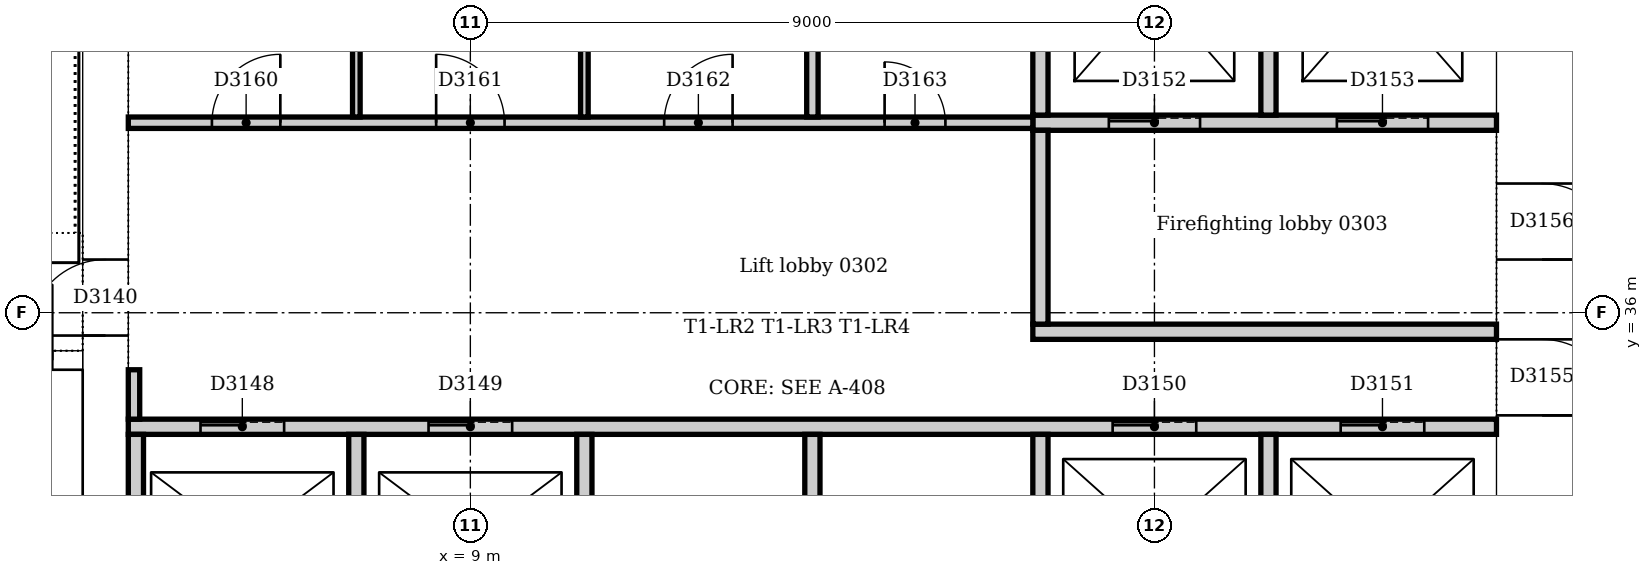
"""IFC4 building model, lengths in metres.
Left out: names, types, materials, properties, quantities, classifications, styles, units other than length and angle.
Written with IfcOpenShell. Run it as: python <this file> out.ifc"""

import sys

from ifc_helpers import new_model, si_unit, direction, frame, frame_2d, origin, place, context, subcontext, project, spatial, rectangle, extrude, element, fill, save


model = new_model("IFC4")
c1 = context("Model", 3, precision=1e-05, world=origin(), true_north=direction((0.0, 1.0)))
c2 = subcontext(c1, "Body", "Model", "MODEL_VIEW")
j1 = project(units=[si_unit("LENGTHUNIT", "METRE"), si_unit("PLANEANGLEUNIT", "RADIAN")], contexts=[c1])
p1 = place(None, origin())
s1 = spatial("IfcSite", under=j1, at=p1, CompositionType="ELEMENT")
p2 = place(p1, origin())
s2 = spatial("IfcBuilding", under=s1, at=p2, CompositionType="ELEMENT")
p3 = place(p2, frame((0.0, 0.0, 16.0)))
s3 = spatial("IfcBuildingStorey", under=s2, at=p3, CompositionType="ELEMENT", Elevation=16.0)
p4 = place(p3, frame((23.1, 31.5, 0.0), z_axis=(0.0, 0.0, 1.0), x_axis=(0.0, 1.0, 0.0)))
e1 = element("IfcWall", 1, at=p4, inside=s3, PredefinedType="SOLIDWALL", context=c2, shape_type="SweptSolid", body=[
    extrude(rectangle(XDim=10.5, YDim=1.2, at=frame_2d((5.25, 0.0))), origin(), (0.0, 0.0, 1.0), 5.0),
])
p5 = place(p4, frame((3.15, 0.0, 0.0)))
e2 = element("IfcOpeningElement", 2, at=p5, cuts=e1, PredefinedType="OPENING", context=c2, shape_type="SweptSolid", body=[
    extrude(rectangle(XDim=1.0, YDim=2.1, at=frame_2d((0.5, 1.05))), frame((0.0, 0.61, 0.0), z_axis=(0.0, -1.0, 0.0), x_axis=(1.0, 0.0, 0.0)), (0.0, 0.0, 1.0), 1.22),
])
p6 = place(p4, frame((5.2, 0.0, 0.0)))
e3 = element("IfcOpeningElement", 3, at=p6, cuts=e1, PredefinedType="OPENING", context=c2, shape_type="SweptSolid", body=[
    extrude(rectangle(XDim=1.0, YDim=2.1, at=frame_2d((0.5, 1.05))), frame((0.0, 0.61, 0.0), z_axis=(0.0, -1.0, 0.0), x_axis=(1.0, 0.0, 0.0)), (0.0, 0.0, 1.0), 1.22),
])
p7 = place(p3, frame((4.2, 42.0, 0.0), z_axis=(0.0, 0.0, 1.0), x_axis=(0.0, -1.0, 0.0)))
e4 = element("IfcWall", 4, at=p7, inside=s3, PredefinedType="SOLIDWALL", context=c2, shape_type="SweptSolid", body=[
    extrude(rectangle(XDim=10.5, YDim=0.6, at=frame_2d((5.25, 0.0))), origin(), (0.0, 0.0, 1.0), 5.0),
])
p8 = place(p7, frame((5.3, 0.0, 0.0)))
e5 = element("IfcOpeningElement", 5, at=p8, cuts=e4, PredefinedType="OPENING", context=c2, shape_type="SweptSolid", body=[
    extrude(rectangle(XDim=1.0, YDim=2.1, at=frame_2d((0.5, 1.05))), frame((0.0, 0.31, 0.0), z_axis=(0.0, -1.0, 0.0), x_axis=(1.0, 0.0, 0.0)), (0.0, 0.0, 1.0), 0.62),
])
p9 = place(p3, frame((0.36, 35.375, 0.0), z_axis=(0.0, 0.0, 1.0), x_axis=(1.0, 0.0, 0.0)))
e6 = element("IfcWall", 6, at=p9, inside=s3, PredefinedType="SOLIDWALL", context=c2, shape_type="SweptSolid", body=[
    extrude(rectangle(XDim=3.54, YDim=0.25, at=frame_2d((1.77, 0.0))), origin(), (0.0, 0.0, 1.0), 5.0),
])
p10 = place(p9, frame((2.14, 0.0, 0.0)))
e7 = element("IfcOpeningElement", 7, at=p10, cuts=e6, PredefinedType="OPENING", context=c2, shape_type="SweptSolid", body=[
    extrude(rectangle(XDim=1.0, YDim=2.1, at=frame_2d((0.5, 1.05))), frame((0.0, 0.135, 0.0), z_axis=(0.0, -1.0, 0.0), x_axis=(1.0, 0.0, 0.0)), (0.0, 0.0, 1.0), 0.27),
])
p11 = place(p3, frame((16.4, 35.75, 0.0), z_axis=(0.0, 0.0, 1.0), x_axis=(1.0, 0.0, 0.0)))
e8 = element("IfcWall", 8, at=p11, inside=s3, PredefinedType="PARTITIONING", context=c2, shape_type="SweptSolid", body=[
    extrude(rectangle(XDim=6.1, YDim=0.2, at=frame_2d((3.05, 0.0))), origin(), (0.0, 0.0, 1.0), 4.7),
])
p12 = place(p3, frame((16.4, 38.5, 0.0), z_axis=(0.0, 0.0, 1.0), x_axis=(1.0, 0.0, 0.0)))
e9 = element("IfcWall", 9, at=p12, inside=s3, PredefinedType="PARTITIONING", context=c2, shape_type="SweptSolid", body=[
    extrude(rectangle(XDim=6.1, YDim=0.2, at=frame_2d((3.05, 0.0))), origin(), (0.0, 0.0, 1.0), 4.7),
])
p13 = place(p12, frame((1.0, 0.0, 0.0)))
e10 = element("IfcOpeningElement", 10, at=p13, cuts=e9, PredefinedType="OPENING", context=c2, shape_type="SweptSolid", body=[
    extrude(rectangle(XDim=1.2, YDim=2.1, at=frame_2d((0.6, 1.05))), frame((0.0, 0.11, 0.0), z_axis=(0.0, -1.0, 0.0), x_axis=(1.0, 0.0, 0.0)), (0.0, 0.0, 1.0), 0.22),
])
p14 = place(p12, frame((4.0, 0.0, 0.0)))
e11 = element("IfcOpeningElement", 11, at=p14, cuts=e9, PredefinedType="OPENING", context=c2, shape_type="SweptSolid", body=[
    extrude(rectangle(XDim=1.2, YDim=2.1, at=frame_2d((0.6, 1.05))), frame((0.0, 0.11, 0.0), z_axis=(0.0, -1.0, 0.0), x_axis=(1.0, 0.0, 0.0)), (0.0, 0.0, 1.0), 0.22),
])
p15 = place(p3, frame((16.5, 35.85, 0.0), z_axis=(0.0, 0.0, 1.0), x_axis=(0.0, 1.0, 0.0)))
e12 = element("IfcWall", 12, at=p15, inside=s3, PredefinedType="PARTITIONING", context=c2, shape_type="SweptSolid", body=[
    extrude(rectangle(XDim=2.55, YDim=0.2, at=frame_2d((1.275, 0.0))), origin(), (0.0, 0.0, 1.0), 4.7),
])
p16 = place(p3, frame((4.5, 34.5, 0.0), z_axis=(0.0, 0.0, 1.0), x_axis=(1.0, 0.0, 0.0)))
e13 = element("IfcWall", 13, at=p16, inside=s3, PredefinedType="PARTITIONING", context=c2, shape_type="SweptSolid", body=[
    extrude(rectangle(XDim=18.0, YDim=0.2, at=frame_2d((9.0, 0.0))), origin(), (0.0, 0.0, 1.0), 4.7),
])
p17 = place(p16, frame((0.95, 0.0, 0.0)))
e14 = element("IfcOpeningElement", 14, at=p17, cuts=e13, PredefinedType="OPENING", context=c2, shape_type="SweptSolid", body=[
    extrude(rectangle(XDim=1.1, YDim=2.1, at=frame_2d((0.55, 1.05))), frame((0.0, 0.11, 0.0), z_axis=(0.0, -1.0, 0.0), x_axis=(1.0, 0.0, 0.0)), (0.0, 0.0, 1.0), 0.22),
])
p18 = place(p16, frame((3.95, 0.0, 0.0)))
e15 = element("IfcOpeningElement", 15, at=p18, cuts=e13, PredefinedType="OPENING", context=c2, shape_type="SweptSolid", body=[
    extrude(rectangle(XDim=1.1, YDim=2.1, at=frame_2d((0.55, 1.05))), frame((0.0, 0.11, 0.0), z_axis=(0.0, -1.0, 0.0), x_axis=(1.0, 0.0, 0.0)), (0.0, 0.0, 1.0), 0.22),
])
p19 = place(p16, frame((12.95, 0.0, 0.0)))
e16 = element("IfcOpeningElement", 16, at=p19, cuts=e13, PredefinedType="OPENING", context=c2, shape_type="SweptSolid", body=[
    extrude(rectangle(XDim=1.1, YDim=2.1, at=frame_2d((0.55, 1.05))), frame((0.0, 0.11, 0.0), z_axis=(0.0, -1.0, 0.0), x_axis=(1.0, 0.0, 0.0)), (0.0, 0.0, 1.0), 0.22),
])
p20 = place(p16, frame((15.95, 0.0, 0.0)))
e17 = element("IfcOpeningElement", 17, at=p20, cuts=e13, PredefinedType="OPENING", context=c2, shape_type="SweptSolid", body=[
    extrude(rectangle(XDim=1.1, YDim=2.1, at=frame_2d((0.55, 1.05))), frame((0.0, 0.11, 0.0), z_axis=(0.0, -1.0, 0.0), x_axis=(1.0, 0.0, 0.0)), (0.0, 0.0, 1.0), 0.22),
])
for number, where, z_axis, x_axis in (
    (18, (16.5, 38.6, 0.0), (0.0, 0.0, 1.0), (0.0, 1.0, 0.0)),
    (19, (19.5, 38.6, 0.0), (0.0, 0.0, 1.0), (0.0, 1.0, 0.0)),
):
    element("IfcWall", number, at=place(p3, frame(where, z_axis=z_axis, x_axis=x_axis)), inside=s3, PredefinedType="PARTITIONING", context=c2, shape_type="SweptSolid", body=[
        extrude(rectangle(XDim=3.4, YDim=0.2, at=frame_2d((1.7, 0.0))), origin(), (0.0, 0.0, 1.0), 4.7),
    ])
for number, where, z_axis, x_axis in (
    (20, (4.6, 31.75, 0.0), (0.0, 0.0, 1.0), (0.0, 1.0, 0.0)),
    (21, (7.5, 31.75, 0.0), (0.0, 0.0, 1.0), (0.0, 1.0, 0.0)),
    (22, (10.5, 31.75, 0.0), (0.0, 0.0, 1.0), (0.0, 1.0, 0.0)),
    (23, (13.5, 31.75, 0.0), (0.0, 0.0, 1.0), (0.0, 1.0, 0.0)),
    (24, (16.5, 31.75, 0.0), (0.0, 0.0, 1.0), (0.0, 1.0, 0.0)),
    (25, (19.5, 31.75, 0.0), (0.0, 0.0, 1.0), (0.0, 1.0, 0.0)),
):
    element("IfcWall", number, at=place(p3, frame(where, z_axis=z_axis, x_axis=x_axis)), inside=s3, PredefinedType="PARTITIONING", context=c2, shape_type="SweptSolid", body=[
        extrude(rectangle(XDim=2.65, YDim=0.2, at=frame_2d((1.325, 0.0))), origin(), (0.0, 0.0, 1.0), 4.7),
    ])
p21 = place(p3, frame((4.5, 38.5, 0.0), z_axis=(0.0, 0.0, 1.0), x_axis=(1.0, 0.0, 0.0)))
e26 = element("IfcWall", 26, at=p21, inside=s3, PredefinedType="PARTITIONING", context=c2, shape_type="SweptSolid", body=[
    extrude(rectangle(XDim=11.9, YDim=0.15, at=frame_2d((5.95, 0.0))), origin(), (0.0, 0.0, 1.0), 4.7),
])
p22 = place(p21, frame((1.1, 0.0, 0.0)))
e27 = element("IfcOpeningElement", 27, at=p22, cuts=e26, PredefinedType="OPENING", context=c2, shape_type="SweptSolid", body=[
    extrude(rectangle(XDim=0.9, YDim=2.1, at=frame_2d((0.45, 1.05))), frame((0.0, 0.085, 0.0), z_axis=(0.0, -1.0, 0.0), x_axis=(1.0, 0.0, 0.0)), (0.0, 0.0, 1.0), 0.17),
])
p23 = place(p21, frame((4.05, 0.0, 0.0)))
e28 = element("IfcOpeningElement", 28, at=p23, cuts=e26, PredefinedType="OPENING", context=c2, shape_type="SweptSolid", body=[
    extrude(rectangle(XDim=0.9, YDim=2.1, at=frame_2d((0.45, 1.05))), frame((0.0, 0.085, 0.0), z_axis=(0.0, -1.0, 0.0), x_axis=(1.0, 0.0, 0.0)), (0.0, 0.0, 1.0), 0.17),
])
p24 = place(p21, frame((7.05, 0.0, 0.0)))
e29 = element("IfcOpeningElement", 29, at=p24, cuts=e26, PredefinedType="OPENING", context=c2, shape_type="SweptSolid", body=[
    extrude(rectangle(XDim=0.9, YDim=2.1, at=frame_2d((0.45, 1.05))), frame((0.0, 0.085, 0.0), z_axis=(0.0, -1.0, 0.0), x_axis=(1.0, 0.0, 0.0)), (0.0, 0.0, 1.0), 0.17),
])
p25 = place(p21, frame((9.95, 0.0, 0.0)))
e30 = element("IfcOpeningElement", 30, at=p25, cuts=e26, PredefinedType="OPENING", context=c2, shape_type="SweptSolid", body=[
    extrude(rectangle(XDim=0.8, YDim=2.1, at=frame_2d((0.4, 1.05))), frame((0.0, 0.085, 0.0), z_axis=(0.0, -1.0, 0.0), x_axis=(1.0, 0.0, 0.0)), (0.0, 0.0, 1.0), 0.17),
])
p26 = place(p3, frame((4.575, 34.6, 0.0), z_axis=(0.0, 0.0, 1.0), x_axis=(0.0, 1.0, 0.0)))
e31 = element("IfcWall", 31, at=p26, inside=s3, PredefinedType="PARTITIONING", context=c2, shape_type="SweptSolid", body=[
    extrude(rectangle(XDim=0.65, YDim=0.15, at=frame_2d((0.325, 0.0))), origin(), (0.0, 0.0, 1.0), 4.7),
])
p27 = place(p3, frame((13.5, 38.575, 0.0), z_axis=(0.0, 0.0, 1.0), x_axis=(0.0, 1.0, 0.0)))
e32 = element("IfcWall", 32, at=p27, inside=s3, PredefinedType="PARTITIONING", context=c2, shape_type="SweptSolid", body=[
    extrude(rectangle(XDim=3.425, YDim=0.15, at=frame_2d((1.712, 0.0))), origin(), (0.0, 0.0, 1.0), 4.7),
])
for number, where, z_axis, x_axis in (
    (33, (7.5, 38.575, 0.0), (0.0, 0.0, 1.0), (0.0, 1.0, 0.0)),
    (34, (10.5, 38.575, 0.0), (0.0, 0.0, 1.0), (0.0, 1.0, 0.0)),
):
    element("IfcWall", number, at=place(p3, frame(where, z_axis=z_axis, x_axis=x_axis)), inside=s3, PredefinedType="PARTITIONING", context=c2, shape_type="SweptSolid", body=[
        extrude(rectangle(XDim=3.425, YDim=0.1, at=frame_2d((1.712, 0.0))), origin(), (0.0, 0.0, 1.0), 4.7),
    ])
p28 = place(p8, frame((1.0, 0.0, 0.0), z_axis=(0.0, 0.0, 1.0), x_axis=(-1.0, 0.0, 0.0)))
e35 = element("IfcDoor", 35, at=p28, inside=s3, OperationType="SINGLE_SWING_LEFT", PredefinedType="DOOR", context=c2, shape_type="SweptSolid", body=[
    extrude(rectangle(XDim=1.0, YDim=2.1, at=frame_2d((0.5, 1.05))), frame((0.0, 0.025, 0.0), z_axis=(0.0, -1.0, 0.0), x_axis=(1.0, 0.0, 0.0)), (0.0, 0.0, 1.0), 0.05),
])
fill(e5, e35)
p29 = place(p17, origin())
e36 = element("IfcDoor", 36, at=p29, inside=s3, OperationType="SLIDING_TO_LEFT", PredefinedType="DOOR", context=c2, shape_type="SweptSolid", body=[
    extrude(rectangle(XDim=1.1, YDim=2.1, at=frame_2d((0.55, 1.05))), frame((0.0, 0.025, 0.0), z_axis=(0.0, -1.0, 0.0), x_axis=(1.0, 0.0, 0.0)), (0.0, 0.0, 1.0), 0.05),
])
fill(e14, e36)
p30 = place(p18, origin())
e37 = element("IfcDoor", 37, at=p30, inside=s3, OperationType="SLIDING_TO_LEFT", PredefinedType="DOOR", context=c2, shape_type="SweptSolid", body=[
    extrude(rectangle(XDim=1.1, YDim=2.1, at=frame_2d((0.55, 1.05))), frame((0.0, 0.025, 0.0), z_axis=(0.0, -1.0, 0.0), x_axis=(1.0, 0.0, 0.0)), (0.0, 0.0, 1.0), 0.05),
])
fill(e15, e37)
p31 = place(p19, origin())
e38 = element("IfcDoor", 38, at=p31, inside=s3, OperationType="SLIDING_TO_LEFT", PredefinedType="DOOR", context=c2, shape_type="SweptSolid", body=[
    extrude(rectangle(XDim=1.1, YDim=2.1, at=frame_2d((0.55, 1.05))), frame((0.0, 0.025, 0.0), z_axis=(0.0, -1.0, 0.0), x_axis=(1.0, 0.0, 0.0)), (0.0, 0.0, 1.0), 0.05),
])
fill(e16, e38)
p32 = place(p20, origin())
e39 = element("IfcDoor", 39, at=p32, inside=s3, OperationType="SLIDING_TO_LEFT", PredefinedType="DOOR", context=c2, shape_type="SweptSolid", body=[
    extrude(rectangle(XDim=1.1, YDim=2.1, at=frame_2d((0.55, 1.05))), frame((0.0, 0.025, 0.0), z_axis=(0.0, -1.0, 0.0), x_axis=(1.0, 0.0, 0.0)), (0.0, 0.0, 1.0), 0.05),
])
fill(e17, e39)
p33 = place(p13, origin())
e40 = element("IfcDoor", 40, at=p33, inside=s3, OperationType="SLIDING_TO_LEFT", PredefinedType="DOOR", context=c2, shape_type="SweptSolid", body=[
    extrude(rectangle(XDim=1.2, YDim=2.1, at=frame_2d((0.6, 1.05))), frame((0.0, 0.025, 0.0), z_axis=(0.0, -1.0, 0.0), x_axis=(1.0, 0.0, 0.0)), (0.0, 0.0, 1.0), 0.05),
])
fill(e10, e40)
p34 = place(p14, origin())
e41 = element("IfcDoor", 41, at=p34, inside=s3, OperationType="SLIDING_TO_LEFT", PredefinedType="DOOR", context=c2, shape_type="SweptSolid", body=[
    extrude(rectangle(XDim=1.2, YDim=2.1, at=frame_2d((0.6, 1.05))), frame((0.0, 0.025, 0.0), z_axis=(0.0, -1.0, 0.0), x_axis=(1.0, 0.0, 0.0)), (0.0, 0.0, 1.0), 0.05),
])
fill(e11, e41)
p35 = place(p5, frame((1.0, 0.0, 0.0), z_axis=(0.0, 0.0, 1.0), x_axis=(-1.0, 0.0, 0.0)))
e42 = element("IfcDoor", 42, at=p35, inside=s3, OperationType="SINGLE_SWING_RIGHT", PredefinedType="DOOR", context=c2, shape_type="SweptSolid", body=[
    extrude(rectangle(XDim=1.0, YDim=2.1, at=frame_2d((0.5, 1.05))), frame((0.0, 0.025, 0.0), z_axis=(0.0, -1.0, 0.0), x_axis=(1.0, 0.0, 0.0)), (0.0, 0.0, 1.0), 0.05),
])
fill(e2, e42)
p36 = place(p6, frame((1.0, 0.0, 0.0), z_axis=(0.0, 0.0, 1.0), x_axis=(-1.0, 0.0, 0.0)))
e43 = element("IfcDoor", 43, at=p36, inside=s3, OperationType="SINGLE_SWING_RIGHT", PredefinedType="DOOR", context=c2, shape_type="SweptSolid", body=[
    extrude(rectangle(XDim=1.0, YDim=2.1, at=frame_2d((0.5, 1.05))), frame((0.0, 0.025, 0.0), z_axis=(0.0, -1.0, 0.0), x_axis=(1.0, 0.0, 0.0)), (0.0, 0.0, 1.0), 0.05),
])
fill(e3, e43)
p37 = place(p22, origin())
e44 = element("IfcDoor", 44, at=p37, inside=s3, OperationType="SINGLE_SWING_RIGHT", PredefinedType="DOOR", context=c2, shape_type="SweptSolid", body=[
    extrude(rectangle(XDim=0.9, YDim=2.1, at=frame_2d((0.45, 1.05))), frame((0.0, 0.025, 0.0), z_axis=(0.0, -1.0, 0.0), x_axis=(1.0, 0.0, 0.0)), (0.0, 0.0, 1.0), 0.05),
])
fill(e27, e44)
p38 = place(p23, origin())
e45 = element("IfcDoor", 45, at=p38, inside=s3, OperationType="SINGLE_SWING_LEFT", PredefinedType="DOOR", context=c2, shape_type="SweptSolid", body=[
    extrude(rectangle(XDim=0.9, YDim=2.1, at=frame_2d((0.45, 1.05))), frame((0.0, 0.025, 0.0), z_axis=(0.0, -1.0, 0.0), x_axis=(1.0, 0.0, 0.0)), (0.0, 0.0, 1.0), 0.05),
])
fill(e28, e45)
p39 = place(p24, origin())
e46 = element("IfcDoor", 46, at=p39, inside=s3, OperationType="SINGLE_SWING_RIGHT", PredefinedType="DOOR", context=c2, shape_type="SweptSolid", body=[
    extrude(rectangle(XDim=0.9, YDim=2.1, at=frame_2d((0.45, 1.05))), frame((0.0, 0.025, 0.0), z_axis=(0.0, -1.0, 0.0), x_axis=(1.0, 0.0, 0.0)), (0.0, 0.0, 1.0), 0.05),
])
fill(e29, e46)
p40 = place(p25, origin())
e47 = element("IfcDoor", 47, at=p40, inside=s3, OperationType="SINGLE_SWING_LEFT", PredefinedType="DOOR", context=c2, shape_type="SweptSolid", body=[
    extrude(rectangle(XDim=0.8, YDim=2.1, at=frame_2d((0.4, 1.05))), frame((0.0, 0.025, 0.0), z_axis=(0.0, -1.0, 0.0), x_axis=(1.0, 0.0, 0.0)), (0.0, 0.0, 1.0), 0.05),
])
fill(e30, e47)
save(model, sys.argv[1])
